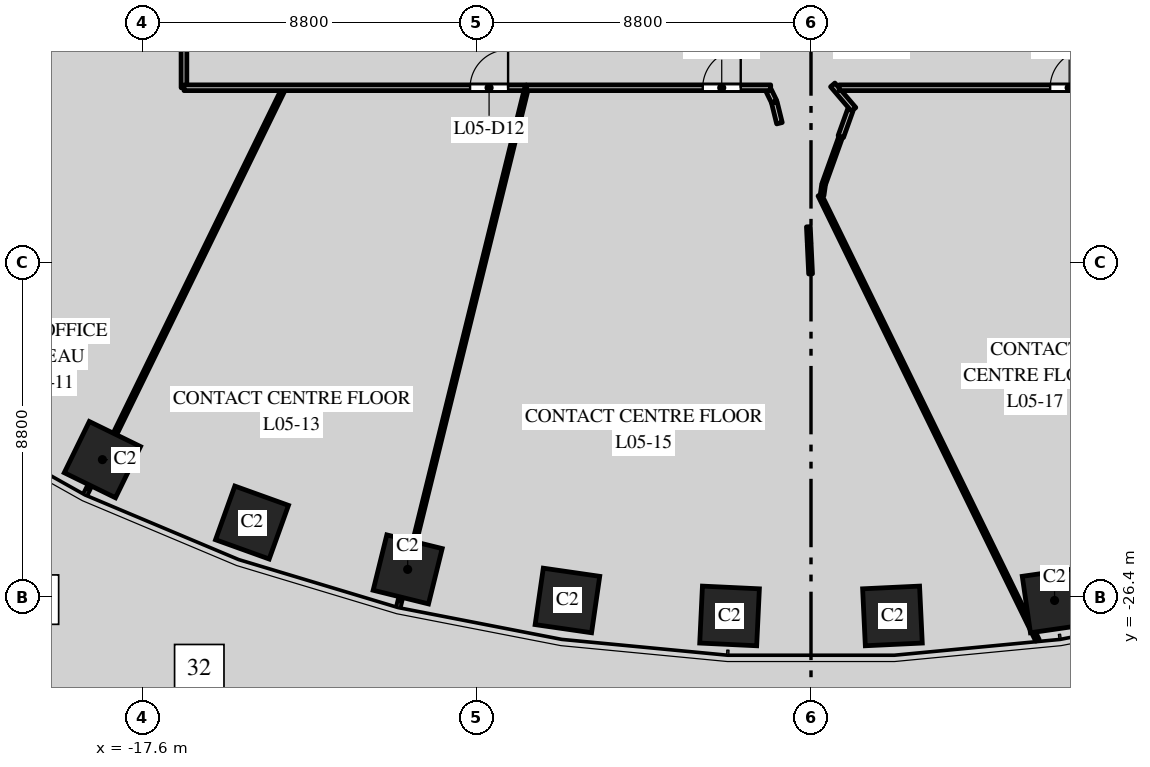
"""IFC4 building model, lengths in metres.
Left out: names, types, materials, properties, quantities, classifications, styles, units other than length and angle.
Written with IfcOpenShell. Run it as: python <this file> out.ifc"""

import sys

from ifc_helpers import new_model, si_unit, direction, frame, frame_2d, origin, origin_2d, place, context, subcontext, project, spatial, rectangle, extrude, element, fill, save


model = new_model("IFC4")
c1 = context("Model", 3, precision=1e-05, world=origin(), true_north=direction((0.0, 1.0)))
c2 = subcontext(c1, "Body", "Model", "MODEL_VIEW")
j1 = project(units=[si_unit("LENGTHUNIT", "METRE"), si_unit("PLANEANGLEUNIT", "RADIAN")], contexts=[c1])
p1 = place(None, origin())
s1 = spatial("IfcSite", under=j1, at=p1, CompositionType="ELEMENT")
p2 = place(p1, origin())
s2 = spatial("IfcBuilding", under=s1, at=p2, CompositionType="ELEMENT")
p3 = place(p2, frame((0.0, 0.0, 30.5)))
s3 = spatial("IfcBuildingStorey", under=s2, at=p3, CompositionType="ELEMENT", Elevation=30.5)
for number, where, z_axis, x_axis in (
    (1, (-18.646, -22.785, 0.0), (0.0, 0.0, 1.0), (0.898, -0.439, 0.0)),
    (2, (-14.709, -24.441, 0.0), (0.0, 0.0, 1.0), (0.941, -0.338, 0.0)),
    (3, (-10.613, -25.674, 0.0), (0.0, 0.0, 1.0), (0.971, -0.24, 0.0)),
    (4, (-6.409, -26.491, 0.0), (0.0, 0.0, 1.0), (0.99, -0.143, 0.0)),
    (5, (-2.143, -26.898, 0.0), (0.0, 0.0, 1.0), (0.999, -0.048, 0.0)),
    (6, (2.143, -26.898, 0.0), (0.0, 0.0, 1.0), (0.999, 0.048, 0.0)),
    (7, (6.409, -26.491, 0.0), (0.0, 0.0, 1.0), (0.99, 0.143, 0.0)),
):
    element("IfcColumn", number, at=place(p3, frame(where, z_axis=z_axis, x_axis=x_axis)), inside=s3, PredefinedType="COLUMN", context=c2, shape_type="SweptSolid", body=[
        extrude(rectangle(XDim=1.5, YDim=1.5, at=origin_2d()), origin(), (0.0, 0.0, 1.0), 4.0),
    ])
p4 = place(p3, frame((-26.43, -18.945, 0.0), z_axis=(0.0, 0.0, 1.0), x_axis=(0.646400187952, 0.762998556365, 0.0)))
e8 = element("IfcWall", 8, at=p4, inside=s3, PredefinedType="PARTITIONING", context=c2, shape_type="SweptSolid", body=[
    extrude(rectangle(XDim=10.704, YDim=0.1, at=frame_2d((5.352, 0.0))), origin(), (0.0, 0.0, 1.0), 3.7),
])
p5 = place(p3, frame((-19.086, -23.685, 0.0), z_axis=(0.0, 0.0, 1.0), x_axis=(0.439199750603, 0.898389436197, 0.0)))
e9 = element("IfcWall", 9, at=p5, inside=s3, PredefinedType="PARTITIONING", context=c2, shape_type="SweptSolid", body=[
    extrude(rectangle(XDim=11.81, YDim=0.1, at=frame_2d((5.905, 0.0))), origin(), (0.0, 0.0, 1.0), 3.7),
])
p6 = place(p3, frame((-16.5, -13.0, 0.0), z_axis=(0.0, 0.0, 1.0), x_axis=(0.0, 1.0, 0.0)))
e10 = element("IfcWall", 10, at=p6, inside=s3, PredefinedType="PARTITIONING", context=c2, shape_type="SweptSolid", body=[
    extrude(rectangle(XDim=2.3, YDim=0.15, at=frame_2d((1.15, 0.0))), origin(), (0.0, 0.0, 1.0), 2.75),
])
p7 = place(p3, frame((-16.5, -13.0, 0.0), z_axis=(0.0, 0.0, 1.0), x_axis=(1.0, 0.0, 0.0)))
e11 = element("IfcWall", 11, at=p7, inside=s3, PredefinedType="PARTITIONING", context=c2, shape_type="SweptSolid", body=[
    extrude(rectangle(XDim=9.001, YDim=0.15, at=frame_2d((4.5, 0.0))), origin(), (0.0, 0.0, 1.0), 2.85),
])
p8 = place(p7, frame((7.529, 0.0, 0.0)))
e12 = element("IfcOpeningElement", 12, at=p8, cuts=e11, PredefinedType="OPENING", context=c2, shape_type="SweptSolid", body=[
    extrude(rectangle(XDim=1.0, YDim=2.1, at=frame_2d((0.5, 1.05))), frame((0.0, 0.085, 0.0), z_axis=(0.0, -1.0, 0.0), x_axis=(1.0, 0.0, 0.0)), (0.0, 0.0, 1.0), 0.17),
])
p9 = place(p3, frame((-10.853, -26.646, 0.0), z_axis=(0.0, 0.0, 1.0), x_axis=(0.239763745499, 0.97083126564, 0.0)))
e13 = element("IfcWall", 13, at=p9, inside=s3, PredefinedType="PARTITIONING", context=c2, shape_type="SweptSolid", body=[
    extrude(rectangle(XDim=14.056, YDim=0.1, at=frame_2d((7.028, 0.0))), origin(), (0.0, 0.0, 1.0), 2.85),
])
p10 = place(p3, frame((-7.483, -13.0, 0.0), z_axis=(0.0, 0.0, 1.0), x_axis=(1.0, 0.0, 0.0)))
e14 = element("IfcWall", 14, at=p10, inside=s3, PredefinedType="PARTITIONING", context=c2, shape_type="SweptSolid", body=[
    extrude(rectangle(XDim=6.422, YDim=0.15, at=frame_2d((3.211, 0.0))), origin(), (0.0, 0.0, 1.0), 2.85),
])
p11 = place(p10, frame((4.634, 0.0, 0.0)))
e15 = element("IfcOpeningElement", 15, at=p11, cuts=e14, PredefinedType="OPENING", context=c2, shape_type="SweptSolid", body=[
    extrude(rectangle(XDim=1.0, YDim=2.1, at=frame_2d((0.5, 1.05))), frame((0.0, 0.085, 0.0), z_axis=(0.0, -1.0, 0.0), x_axis=(1.0, 0.0, 0.0)), (0.0, 0.0, 1.0), 0.17),
])
p12 = place(p3, frame((-1.111, -13.079, 0.0), z_axis=(0.0, 0.0, 1.0), x_axis=(0.440240923942, -0.897879685084, 0.0)))
e16 = element("IfcWall", 16, at=p12, inside=s3, PredefinedType="PARTITIONING", context=c2, shape_type="SweptSolid", body=[
    extrude(rectangle(XDim=0.323, YDim=0.15, at=frame_2d((0.161, 0.0))), origin(), (0.0, 0.0, 1.0), 2.85),
])
p13 = place(p3, frame((-0.965, -13.386, 0.0), z_axis=(0.0, 0.0, 1.0), x_axis=(0.239578315167, -0.970877042113, 0.0)))
e17 = element("IfcWall", 17, at=p13, inside=s3, PredefinedType="PARTITIONING", context=c2, shape_type="SweptSolid", body=[
    extrude(rectangle(XDim=0.563, YDim=0.15, at=frame_2d((0.282, 0.0))), origin(), (0.0, 0.0, 1.0), 2.85),
])
p14 = place(p3, frame((-0.069, -16.658, 0.0), z_axis=(0.0, 0.0, 1.0), x_axis=(0.047263912187, -0.998882436829, 0.0)))
e18 = element("IfcWall", 18, at=p14, inside=s3, PredefinedType="PARTITIONING", context=c2, shape_type="SweptSolid", body=[
    extrude(rectangle(XDim=0.424, YDim=0.1, at=frame_2d((0.212, 0.0))), origin(), (0.0, 0.0, 1.0), 3.7),
])
p15 = place(p3, frame((-0.048, -17.108, 0.0), z_axis=(0.0, 0.0, 1.0), x_axis=(0.046977779105, -0.998895934655, 0.0)))
e19 = element("IfcWall", 19, at=p15, inside=s3, PredefinedType="PARTITIONING", context=c2, shape_type="SweptSolid", body=[
    extrude(rectangle(XDim=0.79, YDim=0.1, at=frame_2d((0.395, 0.0))), origin(), (0.0, 0.0, 1.0), 3.7),
])
p16 = place(p3, frame((0.231, -15.824, 0.0), z_axis=(0.0, 0.0, 1.0), x_axis=(0.439219534853, -0.89837976391, 0.0)))
e20 = element("IfcWall", 20, at=p16, inside=s3, PredefinedType="PARTITIONING", context=c2, shape_type="SweptSolid", body=[
    extrude(rectangle(XDim=13.039, YDim=0.1, at=frame_2d((6.52, 0.0))), origin(), (0.0, 0.0, 1.0), 2.85),
])
p17 = place(p3, frame((0.291, -15.832, 0.0), z_axis=(0.0, 0.0, 1.0), x_axis=(0.141883286424, 0.989883393655, 0.0)))
e21 = element("IfcWall", 21, at=p17, inside=s3, PredefinedType="PARTITIONING", context=c2, shape_type="SweptSolid", body=[
    extrude(rectangle(XDim=0.296, YDim=0.1, at=frame_2d((0.148, 0.0))), origin(), (0.0, 0.0, 1.0), 3.7),
])
p18 = place(p3, frame((0.34, -15.521, 0.0), z_axis=(0.0, 0.0, 1.0), x_axis=(0.338162451205, 0.941087751804, 0.0)))
e22 = element("IfcWall", 22, at=p18, inside=s3, PredefinedType="PARTITIONING", context=c2, shape_type="SweptSolid", body=[
    extrude(rectangle(XDim=1.304, YDim=0.1, at=frame_2d((0.652, 0.0))), origin(), (0.0, 0.0, 1.0), 3.7),
])
p19 = place(p3, frame((0.572, -12.925, 0.0), z_axis=(0.0, 0.0, 1.0), x_axis=(0.648868148451, -0.760900864717, 0.0)))
e23 = element("IfcWall", 23, at=p19, inside=s3, PredefinedType="PARTITIONING", context=c2, shape_type="SweptSolid", body=[
    extrude(rectangle(XDim=0.848, YDim=0.15, at=frame_2d((0.424, 0.0))), origin(), (0.0, 0.0, 1.0), 3.7),
])
p20 = place(p3, frame((0.742, -13.0, 0.0), z_axis=(0.0, 0.0, 1.0), x_axis=(1.0, 0.0, 0.0)))
e24 = element("IfcWall", 24, at=p20, inside=s3, PredefinedType="PARTITIONING", context=c2, shape_type="SweptSolid", body=[
    extrude(rectangle(XDim=7.305, YDim=0.15, at=frame_2d((3.653, 0.0))), origin(), (0.0, 0.0, 1.0), 2.85),
])
p21 = place(p20, frame((5.551, 0.0, 0.0)))
e25 = element("IfcOpeningElement", 25, at=p21, cuts=e24, PredefinedType="OPENING", context=c2, shape_type="SweptSolid", body=[
    extrude(rectangle(XDim=1.0, YDim=2.1, at=frame_2d((0.5, 1.05))), frame((0.0, 0.085, 0.0), z_axis=(0.0, -1.0, 0.0), x_axis=(1.0, 0.0, 0.0)), (0.0, 0.0, 1.0), 0.17),
])
p22 = place(p3, frame((0.784, -14.285, 0.0), z_axis=(0.0, 0.0, 1.0), x_axis=(0.337939421495, 0.941167863561, 0.0)))
e26 = element("IfcWall", 26, at=p22, inside=s3, PredefinedType="PARTITIONING", context=c2, shape_type="SweptSolid", body=[
    extrude(rectangle(XDim=0.743, YDim=0.15, at=frame_2d((0.371, 0.0))), origin(), (0.0, 0.0, 1.0), 3.7),
])
p23 = place(p8, origin())
e27 = element("IfcDoor", 27, at=p23, inside=s3, OperationType="SINGLE_SWING_RIGHT", PredefinedType="DOOR", context=c2, shape_type="SweptSolid", body=[
    extrude(rectangle(XDim=1.0, YDim=2.1, at=frame_2d((0.5, 1.05))), frame((0.0, 0.025, 0.0), z_axis=(0.0, -1.0, 0.0), x_axis=(1.0, 0.0, 0.0)), (0.0, 0.0, 1.0), 0.05),
])
fill(e12, e27)
p24 = place(p11, origin())
e28 = element("IfcDoor", 28, at=p24, inside=s3, OperationType="SINGLE_SWING_RIGHT", PredefinedType="DOOR", context=c2, shape_type="SweptSolid", body=[
    extrude(rectangle(XDim=1.0, YDim=2.1, at=frame_2d((0.5, 1.05))), frame((0.0, 0.025, 0.0), z_axis=(0.0, -1.0, 0.0), x_axis=(1.0, 0.0, 0.0)), (0.0, 0.0, 1.0), 0.05),
])
fill(e15, e28)
p25 = place(p21, origin())
e29 = element("IfcDoor", 29, at=p25, inside=s3, OperationType="SINGLE_SWING_RIGHT", PredefinedType="DOOR", context=c2, shape_type="SweptSolid", body=[
    extrude(rectangle(XDim=1.0, YDim=2.1, at=frame_2d((0.5, 1.05))), frame((0.0, 0.025, 0.0), z_axis=(0.0, -1.0, 0.0), x_axis=(1.0, 0.0, 0.0)), (0.0, 0.0, 1.0), 0.05),
])
fill(e25, e29)
save(model, sys.argv[1])
